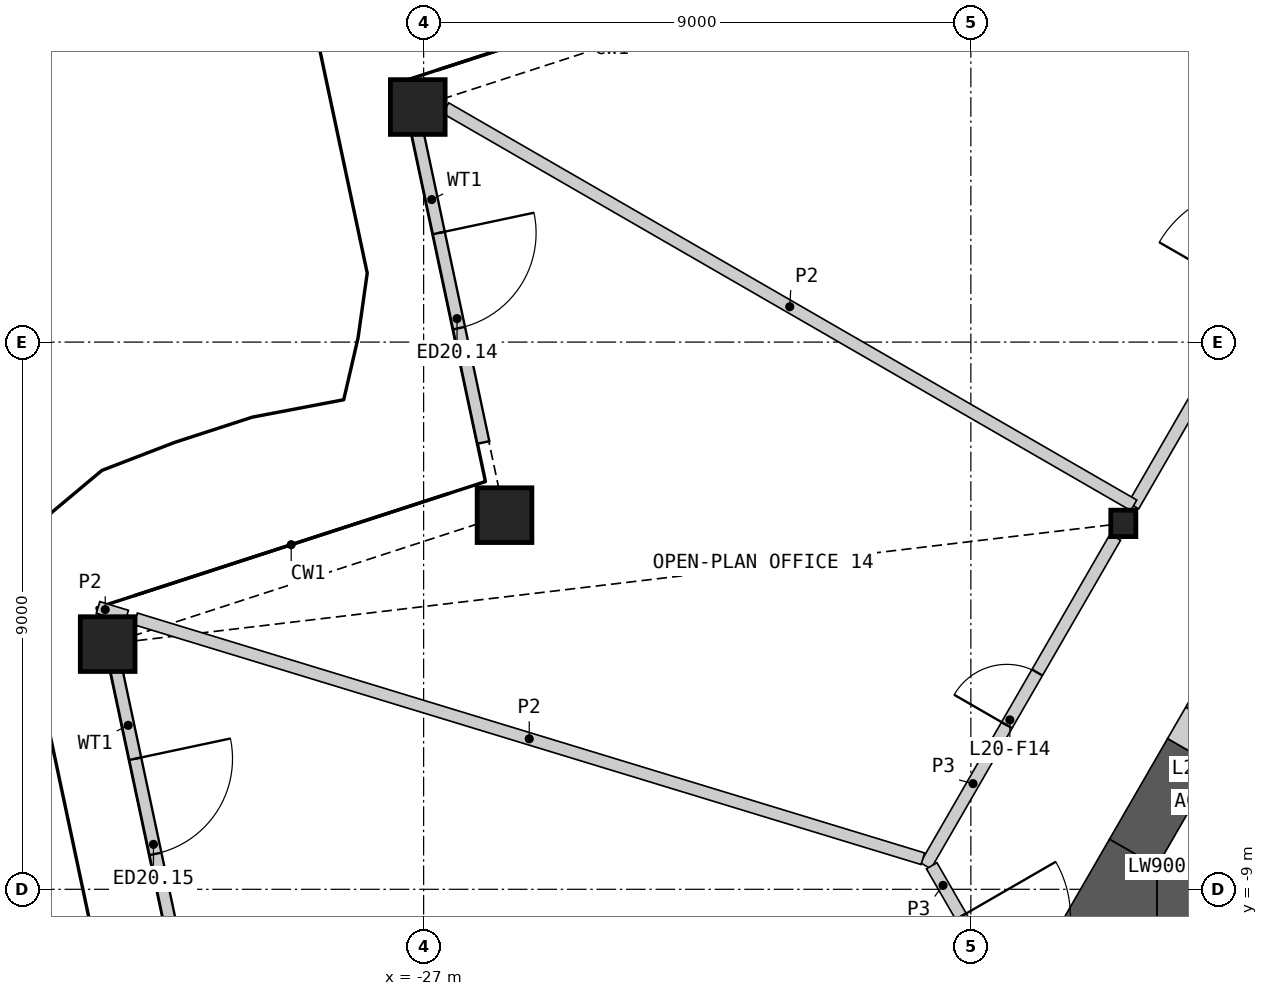
"""IFC4 building model, lengths in metres.
Left out: names, types, materials, properties, quantities, classifications, styles, units other than length and angle.
Written with IfcOpenShell. Run it as: python <this file> out.ifc"""

import sys

from ifc_helpers import new_model, si_unit, direction, frame, frame_2d, origin, origin_2d, place, context, subcontext, project, spatial, polyline, rectangle, hollow_rectangle, i_section, outline, extrude, element, fill, save


model = new_model("IFC4")
c1 = context("Model", 3, precision=1e-05, world=origin(), true_north=direction((0.0, 1.0)))
c2 = subcontext(c1, "Body", "Model", "MODEL_VIEW")
j1 = project(units=[si_unit("LENGTHUNIT", "METRE"), si_unit("PLANEANGLEUNIT", "RADIAN")], contexts=[c1])
p1 = place(None, origin())
s1 = spatial("IfcSite", under=j1, at=p1, CompositionType="ELEMENT")
p2 = place(p1, origin())
s2 = spatial("IfcBuilding", under=s1, at=p2, CompositionType="ELEMENT")
p3 = place(p2, frame((0.0, 0.0, 99.6)))
s3 = spatial("IfcBuildingStorey", under=s2, at=p3, CompositionType="ELEMENT", Elevation=99.6)
for number, where, z_axis, x_axis in (
    (1, (-27.096, 3.866, 0.0), (0.0, 0.0, 1.0), (1.0, 0.0, 0.0)),
    (2, (-25.669, -2.846, 0.0), (0.0, 0.0, 1.0), (1.0, 0.0, 0.0)),
    (3, (-32.196, -4.967, 0.0), (0.0, 0.0, 1.0), (1.0, 0.0, 0.0)),
):
    element("IfcColumn", number, at=place(p3, frame(where, z_axis=z_axis, x_axis=x_axis)), inside=s3, PredefinedType="COLUMN", context=c2, shape_type="SweptSolid", body=[
        extrude(hollow_rectangle(XDim=0.9, YDim=0.9, WallThickness=0.06, at=origin_2d()), origin(), (0.0, 0.0, 1.0), 4.2),
    ])
p4 = place(p3, frame((-15.493, -2.982, 0.0), z_axis=(0.0, 0.0, 1.0), x_axis=(1.0, 0.0, 0.0)))
e4 = element("IfcColumn", 4, at=p4, inside=s3, PredefinedType="COLUMN", context=c2, shape_type="SweptSolid", body=[
    extrude(i_section(OverallWidth=0.412, OverallDepth=0.435, WebThickness=0.036, FlangeThickness=0.057, at=origin_2d()), origin(), (0.0, 0.0, 1.0), 4.2),
])
p5 = place(p3, frame((-27.15, 3.676, 0.0), z_axis=(0.0, 0.0, 1.0), x_axis=(0.207912369528, -0.978147456469, 0.0)))
e5 = element("IfcWall", 5, at=p5, inside=s3, PredefinedType="SOLIDWALL", context=c2, shape_type="SweptSolid", body=[
    extrude(rectangle(XDim=5.446, YDim=0.2, at=frame_2d((2.723, 0.0))), origin(), (0.0, 0.0, 1.0), 3.189),
])
p6 = place(p5, frame((1.923, 0.0, 0.0)))
e6 = element("IfcOpeningElement", 6, at=p6, cuts=e5, PredefinedType="OPENING", context=c2, shape_type="SweptSolid", body=[
    extrude(rectangle(XDim=1.6, YDim=2.4, at=frame_2d((0.8, 1.2))), frame((0.0, 0.11, 0.0), z_axis=(0.0, -1.0, 0.0), x_axis=(1.0, 0.0, 0.0)), (0.0, 0.0, 1.0), 0.22),
])
p7 = place(p3, frame((-32.142, -4.971, 0.0), z_axis=(0.0, 0.0, 1.0), x_axis=(0.207903253291, -0.978149394148, 0.0)))
e7 = element("IfcWall", 7, at=p7, inside=s3, PredefinedType="SOLIDWALL", context=c2, shape_type="SweptSolid", body=[
    extrude(rectangle(XDim=5.446, YDim=0.2, at=frame_2d((2.723, 0.0))), origin(), (0.0, 0.0, 1.0), 3.189),
])
p8 = place(p7, frame((1.923, 0.0, 0.0)))
e8 = element("IfcOpeningElement", 8, at=p8, cuts=e7, PredefinedType="OPENING", context=c2, shape_type="SweptSolid", body=[
    extrude(rectangle(XDim=1.6, YDim=2.4, at=frame_2d((0.8, 1.2))), frame((0.0, 0.11, 0.0), z_axis=(0.0, -1.0, 0.0), x_axis=(1.0, 0.0, 0.0)), (0.0, 0.0, 1.0), 0.22),
])
p9 = place(p3, frame((-14.941, -9.076, 0.0), z_axis=(0.0, 0.0, 1.0), x_axis=(1.0, 0.0, 0.0)))
e9 = element("IfcWall", 9, at=p9, inside=s3, PredefinedType="SHEAR", context=c2, shape_type="SweptSolid", body=[
    extrude(rectangle(XDim=5.627, YDim=0.9, at=frame_2d((2.813, 0.0))), origin(), (0.0, 0.0, 1.0), 3.8),
])
p10 = place(p3, frame((-14.375, -6.745, 0.0), z_axis=(0.0, 0.0, 1.0), x_axis=(-0.499928740635, -0.866066541489, 0.0)))
e10 = element("IfcWall", 10, at=p10, inside=s3, PredefinedType="SHEAR", context=c2, shape_type="SweptSolid", body=[
    extrude(rectangle(XDim=1.912, YDim=0.9, at=frame_2d((0.956, 0.0))), origin(), (0.0, 0.0, 1.0), 3.8),
])
p11 = place(p3, origin())
e11 = element("IfcWall", 11, at=p11, inside=s3, PredefinedType="SHEAR", context=c2, shape_type="SweptSolid", body=[
    extrude(outline(polyline([(-14.941, -8.626), (-14.941, -9.526), (-16.5, -9.526), (-15.721, -8.176), (-14.941, -8.626)])), origin(), (0.0, 0.0, 1.0), 3.8),
])
p12 = place(p3, frame((-13.275, -4.84, 0.0), z_axis=(0.0, 0.0, 1.0), x_axis=(-0.50002983664, -0.866008176907, 0.0)))
e12 = element("IfcWall", 12, at=p12, inside=s3, PredefinedType="SHEAR", context=c2, shape_type="SweptSolid", body=[
    extrude(rectangle(XDim=2.2, YDim=0.9, at=frame_2d((1.1, 0.0))), origin(), (0.0, 0.0, 1.0), 3.8),
])
p13 = place(p12, frame((0.6, 0.0, 0.0)))
e13 = element("IfcOpeningElement", 13, at=p13, cuts=e12, PredefinedType="OPENING", context=c2, shape_type="SweptSolid", body=[
    extrude(rectangle(XDim=1.0, YDim=2.1, at=frame_2d((0.5, 1.05))), frame((0.0, 0.46, 0.0), z_axis=(0.0, -1.0, 0.0), x_axis=(1.0, 0.0, 0.0)), (0.0, 0.0, 1.0), 0.92),
])
p14 = place(p3, frame((-15.326, -2.693, 0.0), z_axis=(0.0, 0.0, 1.0), x_axis=(0.500010522431, 0.866019328571, 0.0)))
e14 = element("IfcWall", 14, at=p14, inside=s3, PredefinedType="PARTITIONING", context=c2, shape_type="SweptSolid", body=[
    extrude(rectangle(XDim=9.733, YDim=0.2, at=frame_2d((4.866, 0.0))), origin(), (0.0, 0.0, 1.0), 3.8),
])
p15 = place(p14, frame((3.966, 0.0, 0.0)))
e15 = element("IfcOpeningElement", 15, at=p15, cuts=e14, PredefinedType="OPENING", context=c2, shape_type="SweptSolid", body=[
    extrude(rectangle(XDim=1.8, YDim=2.1, at=frame_2d((0.9, 1.05))), frame((0.0, 0.11, 0.0), z_axis=(0.0, -1.0, 0.0), x_axis=(1.0, 0.0, 0.0)), (0.0, 0.0, 1.0), 0.22),
])
p16 = place(p3, frame((-18.744, -8.613, 0.0), z_axis=(0.0, 0.0, 1.0), x_axis=(0.499997920671, 0.866026604282, 0.0)))
e16 = element("IfcWall", 16, at=p16, inside=s3, PredefinedType="PARTITIONING", context=c2, shape_type="SweptSolid", body=[
    extrude(rectangle(XDim=6.24, YDim=0.2, at=frame_2d((3.12, 0.0))), origin(), (0.0, 0.0, 1.0), 3.8),
])
p17 = place(p16, frame((2.67, 0.0, 0.0)))
e17 = element("IfcOpeningElement", 17, at=p17, cuts=e16, PredefinedType="OPENING", context=c2, shape_type="SweptSolid", body=[
    extrude(rectangle(XDim=1.0, YDim=2.1, at=frame_2d((0.5, 1.05))), frame((0.0, 0.11, 0.0), z_axis=(0.0, -1.0, 0.0), x_axis=(1.0, 0.0, 0.0)), (0.0, 0.0, 1.0), 0.22),
])
p18 = place(p3, frame((-18.644, -8.613, 0.0), z_axis=(0.0, 0.0, 1.0), x_axis=(0.499958791762, -0.866049194065, 0.0)))
e18 = element("IfcWall", 18, at=p18, inside=s3, PredefinedType="PARTITIONING", context=c2, shape_type="SweptSolid", body=[
    extrude(rectangle(XDim=3.726, YDim=0.2, at=frame_2d((1.863, 0.0))), origin(), (0.0, 0.0, 1.0), 3.8),
])
p19 = place(p18, frame((0.963, 0.0, 0.0)))
e19 = element("IfcOpeningElement", 19, at=p19, cuts=e18, PredefinedType="OPENING", context=c2, shape_type="SweptSolid", body=[
    extrude(rectangle(XDim=1.8, YDim=2.1, at=frame_2d((0.9, 1.05))), frame((0.0, 0.11, 0.0), z_axis=(0.0, -1.0, 0.0), x_axis=(1.0, 0.0, 0.0)), (0.0, 0.0, 1.0), 0.22),
])
p20 = place(p3, frame((-31.736, -4.552, 0.0), z_axis=(0.0, 0.0, 1.0), x_axis=(0.956574643239, -0.291487481569, 0.0)))
e20 = element("IfcWall", 20, at=p20, inside=s3, PredefinedType="PARTITIONING", context=c2, shape_type="SweptSolid", body=[
    extrude(rectangle(XDim=13.534, YDim=0.2, at=frame_2d((6.767, 0.0))), origin(), (0.0, 0.0, 1.0), 2.885),
])
p21 = place(p3, frame((-26.636, 3.848, 0.0), z_axis=(0.0, 0.0, 1.0), x_axis=(0.866029068465, -0.499993652534, 0.0)))
e21 = element("IfcWall", 21, at=p21, inside=s3, PredefinedType="PARTITIONING", context=c2, shape_type="SweptSolid", body=[
    extrude(rectangle(XDim=13.066, YDim=0.2, at=frame_2d((6.533, 0.0))), origin(), (0.0, 0.0, 1.0), 2.885),
])
p22 = place(p3, frame((-32.354, -4.364, 0.0), z_axis=(0.0, 0.0, 1.0), x_axis=(0.956697940105, -0.291082550832, 0.0)))
e22 = element("IfcWall", 22, at=p22, inside=s3, PredefinedType="PARTITIONING", context=c2, shape_type="SweptSolid", body=[
    extrude(rectangle(XDim=0.491, YDim=0.2, at=frame_2d((0.246, 0.0))), origin(), (0.0, 0.0, 1.0), 2.885),
])
p23 = place(p6, origin())
e23 = element("IfcDoor", 23, at=p23, inside=s3, OperationType="DOUBLE_DOOR_SINGLE_SWING", PredefinedType="DOOR", context=c2, shape_type="SweptSolid", body=[
    extrude(rectangle(XDim=1.6, YDim=2.4, at=frame_2d((0.8, 1.2))), frame((0.0, 0.025, 0.0), z_axis=(0.0, -1.0, 0.0), x_axis=(1.0, 0.0, 0.0)), (0.0, 0.0, 1.0), 0.05),
])
fill(e6, e23)
p24 = place(p8, origin())
e24 = element("IfcDoor", 24, at=p24, inside=s3, OperationType="DOUBLE_DOOR_SINGLE_SWING", PredefinedType="DOOR", context=c2, shape_type="SweptSolid", body=[
    extrude(rectangle(XDim=1.6, YDim=2.4, at=frame_2d((0.8, 1.2))), frame((0.0, 0.025, 0.0), z_axis=(0.0, -1.0, 0.0), x_axis=(1.0, 0.0, 0.0)), (0.0, 0.0, 1.0), 0.05),
])
fill(e8, e24)
p25 = place(p17, origin())
e25 = element("IfcDoor", 25, at=p25, inside=s3, OperationType="SINGLE_SWING_LEFT", PredefinedType="DOOR", context=c2, shape_type="SweptSolid", body=[
    extrude(rectangle(XDim=1.0, YDim=2.1, at=frame_2d((0.5, 1.05))), frame((0.0, 0.025, 0.0), z_axis=(0.0, -1.0, 0.0), x_axis=(1.0, 0.0, 0.0)), (0.0, 0.0, 1.0), 0.05),
])
fill(e17, e25)
p26 = place(p19, origin())
e26 = element("IfcDoor", 26, at=p26, inside=s3, OperationType="DOUBLE_DOOR_SINGLE_SWING", PredefinedType="DOOR", context=c2, shape_type="SweptSolid", body=[
    extrude(rectangle(XDim=1.8, YDim=2.1, at=frame_2d((0.9, 1.05))), frame((0.0, 0.025, 0.0), z_axis=(0.0, -1.0, 0.0), x_axis=(1.0, 0.0, 0.0)), (0.0, 0.0, 1.0), 0.05),
])
fill(e19, e26)
save(model, sys.argv[1])
